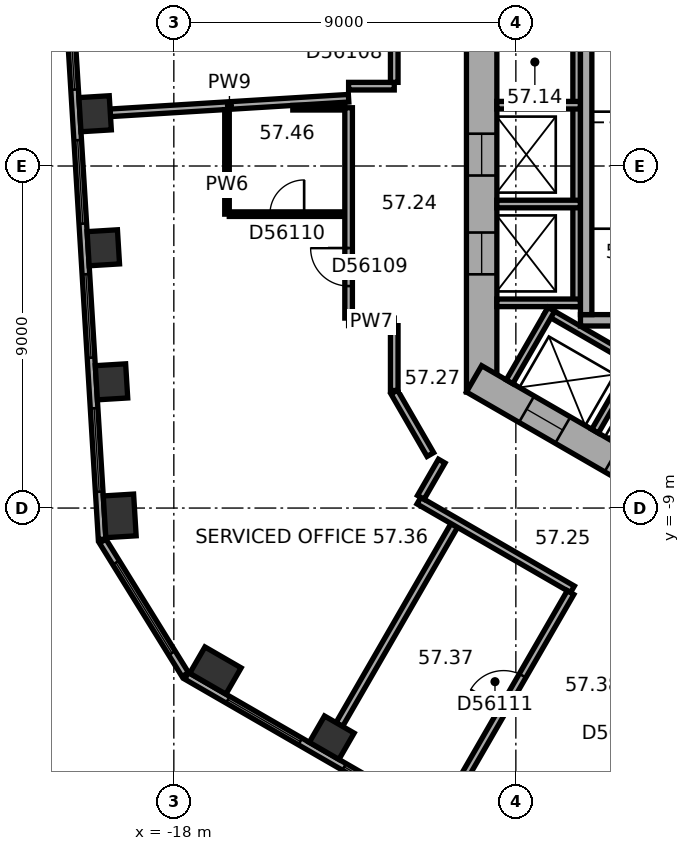
"""IFC4 building model, lengths in metres.
Left out: names, types, materials, properties, quantities, classifications, styles, units other than length and angle.
Written with IfcOpenShell. Run it as: python <this file> out.ifc"""

import sys

from ifc_helpers import new_model, si_unit, direction, frame, frame_2d, origin, origin_2d, place, context, subcontext, project, spatial, rectangle, extrude, element, fill, save


model = new_model("IFC4")
c1 = context("Model", 3, precision=1e-05, world=origin(), true_north=direction((0.0, 1.0)))
c2 = subcontext(c1, "Body", "Model", "MODEL_VIEW")
j1 = project(units=[si_unit("LENGTHUNIT", "METRE"), si_unit("PLANEANGLEUNIT", "RADIAN")], contexts=[c1])
p1 = place(None, origin())
s1 = spatial("IfcSite", under=j1, at=p1, CompositionType="ELEMENT")
p2 = place(p1, origin())
s2 = spatial("IfcBuilding", under=s1, at=p2, CompositionType="ELEMENT")
p3 = place(p2, frame((0.0, 0.0, 232.8)))
s3 = spatial("IfcBuildingStorey", under=s2, at=p3, CompositionType="ELEMENT", Elevation=232.8)
for number, where, z_axis, x_axis in (
    (1, (-20.071, 1.375, 0.0), (0.0, 0.0, 1.0), (0.061, -0.998, 0.0)),
    (2, (-19.856, -2.152, 0.0), (0.0, 0.0, 1.0), (0.061, -0.998, 0.0)),
    (3, (-19.64, -5.679, 0.0), (0.0, 0.0, 1.0), (0.061, -0.998, 0.0)),
):
    element("IfcColumn", number, at=place(p3, frame(where, z_axis=z_axis, x_axis=x_axis)), inside=s3, PredefinedType="COLUMN", context=c2, shape_type="SweptSolid", body=[
        extrude(rectangle(XDim=0.9, YDim=0.8, at=origin_2d()), origin(), (0.0, 0.0, 1.0), 3.7),
    ])
for number, where, z_axis, x_axis in (
    (4, (-19.424, -9.206, 0.0), (0.0, 0.0, 1.0), (0.061, -0.998, 0.0)),
    (5, (-16.906, -13.276, 0.0), (0.0, 0.0, 1.0), (0.866, -0.5, 0.0)),
):
    element("IfcColumn", number, at=place(p3, frame(where, z_axis=z_axis, x_axis=x_axis)), inside=s3, PredefinedType="COLUMN", context=c2, shape_type="SweptSolid", body=[
        extrude(rectangle(XDim=1.1, YDim=0.8, at=origin_2d()), origin(), (0.0, 0.0, 1.0), 3.7),
    ])
p4 = place(p3, frame((-13.845, -15.042, 0.0), z_axis=(0.0, 0.0, 1.0), x_axis=(0.866025403784, -0.5, 0.0)))
e6 = element("IfcColumn", 6, at=p4, inside=s3, PredefinedType="COLUMN", context=c2, shape_type="SweptSolid", body=[
    extrude(rectangle(XDim=0.9, YDim=0.8, at=origin_2d()), origin(), (0.0, 0.0, 1.0), 3.7),
])
p5 = place(p3, frame((-9.9, 5.947, 0.0), z_axis=(0.0, 0.0, 1.0), x_axis=(0.0, -1.0, 0.0)))
e7 = element("IfcWall", 7, at=p5, inside=s3, PredefinedType="SHEAR", context=c2, shape_type="SweptSolid", body=[
    extrude(rectangle(XDim=11.894, YDim=0.8, at=frame_2d((5.947, 0.0))), origin(), (0.0, 0.0, 1.0), 3.7),
])
p6 = place(p5, frame((5.097, 0.0, 0.0)))
e8 = element("IfcOpeningElement", 8, at=p6, cuts=e7, PredefinedType="OPENING", context=c2, shape_type="SweptSolid", body=[
    extrude(rectangle(XDim=1.1, YDim=2.1, at=frame_2d((0.55, 1.05))), frame((0.0, 0.41, 0.0), z_axis=(0.0, -1.0, 0.0), x_axis=(1.0, 0.0, 0.0)), (0.0, 0.0, 1.0), 0.82),
])
p7 = place(p5, frame((7.697, 0.0, 0.0)))
e9 = element("IfcOpeningElement", 9, at=p7, cuts=e7, PredefinedType="OPENING", context=c2, shape_type="SweptSolid", body=[
    extrude(rectangle(XDim=1.1, YDim=2.1, at=frame_2d((0.55, 1.05))), frame((0.0, 0.41, 0.0), z_axis=(0.0, -1.0, 0.0), x_axis=(1.0, 0.0, 0.0)), (0.0, 0.0, 1.0), 0.82),
])
p8 = place(p3, frame((-10.1, -5.6, 0.0), z_axis=(0.0, 0.0, 1.0), x_axis=(0.866023897231, -0.500002609418, 0.0)))
e10 = element("IfcWall", 10, at=p8, inside=s3, PredefinedType="SHEAR", context=c2, shape_type="SweptSolid", body=[
    extrude(rectangle(XDim=11.894, YDim=0.8, at=frame_2d((5.947, 0.0))), origin(), (0.0, 0.0, 1.0), 3.7),
])
p9 = place(p8, frame((6.147, 0.0, 0.0)))
e11 = element("IfcOpeningElement", 11, at=p9, cuts=e10, PredefinedType="OPENING", context=c2, shape_type="SweptSolid", body=[
    extrude(rectangle(XDim=1.5, YDim=2.1, at=frame_2d((0.75, 1.05))), frame((0.0, 0.41, 0.0), z_axis=(0.0, -1.0, 0.0), x_axis=(1.0, 0.0, 0.0)), (0.0, 0.0, 1.0), 0.82),
])
p10 = place(p8, frame((1.597, 0.0, 0.0)))
e12 = element("IfcOpeningElement", 12, at=p10, cuts=e10, PredefinedType="OPENING", context=c2, shape_type="SweptSolid", body=[
    extrude(rectangle(XDim=1.1, YDim=2.1, at=frame_2d((0.55, 1.05))), frame((0.0, 0.41, 0.0), z_axis=(0.0, -1.0, 0.0), x_axis=(1.0, 0.0, 0.0)), (0.0, 0.0, 1.0), 0.82),
])
p11 = place(p8, frame((4.197, 0.0, 0.0)))
e13 = element("IfcOpeningElement", 13, at=p11, cuts=e10, PredefinedType="OPENING", context=c2, shape_type="SweptSolid", body=[
    extrude(rectangle(XDim=1.1, YDim=2.1, at=frame_2d((0.55, 1.05))), frame((0.0, 0.41, 0.0), z_axis=(0.0, -1.0, 0.0), x_axis=(1.0, 0.0, 0.0)), (0.0, 0.0, 1.0), 0.82),
])
p12 = place(p3, frame((-21.038, 8.984, 0.0), z_axis=(0.0, 0.0, 1.0), x_axis=(0.061043935634, -0.998135079998, 0.0)))
e14 = element("IfcWall", 14, at=p12, inside=s3, PredefinedType="STANDARD", context=c2, shape_type="SweptSolid", body=[
    extrude(rectangle(XDim=18.841, YDim=0.2, at=frame_2d((9.421, 0.0))), origin(), (0.0, 0.0, 1.0), 3.7),
])
p13 = place(p12, frame((1.253, 0.0, 0.9)))
e15 = element("IfcOpeningElement", 15, at=p13, cuts=e14, PredefinedType="OPENING", context=c2, shape_type="SweptSolid", body=[
    extrude(rectangle(XDim=2.2, YDim=2.0, at=frame_2d((1.1, 1.0))), frame((0.0, 0.11, 0.0), z_axis=(0.0, -1.0, 0.0), x_axis=(1.0, 0.0, 0.0)), (0.0, 0.0, 1.0), 0.22),
])
p14 = place(p12, frame((4.786, 0.0, 0.9)))
e16 = element("IfcOpeningElement", 16, at=p14, cuts=e14, PredefinedType="OPENING", context=c2, shape_type="SweptSolid", body=[
    extrude(rectangle(XDim=2.2, YDim=2.0, at=frame_2d((1.1, 1.0))), frame((0.0, 0.11, 0.0), z_axis=(0.0, -1.0, 0.0), x_axis=(1.0, 0.0, 0.0)), (0.0, 0.0, 1.0), 0.22),
])
p15 = place(p12, frame((8.32, 0.0, 0.9)))
e17 = element("IfcOpeningElement", 17, at=p15, cuts=e14, PredefinedType="OPENING", context=c2, shape_type="SweptSolid", body=[
    extrude(rectangle(XDim=2.2, YDim=2.0, at=frame_2d((1.1, 1.0))), frame((0.0, 0.11, 0.0), z_axis=(0.0, -1.0, 0.0), x_axis=(1.0, 0.0, 0.0)), (0.0, 0.0, 1.0), 0.22),
])
p16 = place(p12, frame((11.854, 0.0, 0.9)))
e18 = element("IfcOpeningElement", 18, at=p16, cuts=e14, PredefinedType="OPENING", context=c2, shape_type="SweptSolid", body=[
    extrude(rectangle(XDim=2.2, YDim=2.0, at=frame_2d((1.1, 1.0))), frame((0.0, 0.11, 0.0), z_axis=(0.0, -1.0, 0.0), x_axis=(1.0, 0.0, 0.0)), (0.0, 0.0, 1.0), 0.22),
])
p17 = place(p12, frame((15.387, 0.0, 0.9)))
e19 = element("IfcOpeningElement", 19, at=p17, cuts=e14, PredefinedType="OPENING", context=c2, shape_type="SweptSolid", body=[
    extrude(rectangle(XDim=2.2, YDim=2.0, at=frame_2d((1.1, 1.0))), frame((0.0, 0.11, 0.0), z_axis=(0.0, -1.0, 0.0), x_axis=(1.0, 0.0, 0.0)), (0.0, 0.0, 1.0), 0.22),
])
p18 = place(p3, frame((-19.873, -9.869, 0.0), z_axis=(0.0, 0.0, 1.0), x_axis=(0.52626914263, -0.850318051975, 0.0)))
e20 = element("IfcWall", 20, at=p18, inside=s3, PredefinedType="STANDARD", context=c2, shape_type="SweptSolid", body=[
    extrude(rectangle(XDim=4.13, YDim=0.2, at=frame_2d((2.065, 0.0))), origin(), (0.0, 0.0, 1.0), 3.7),
])
p19 = place(p18, frame((0.665, 0.0, 0.9)))
e21 = element("IfcOpeningElement", 21, at=p19, cuts=e20, PredefinedType="OPENING", context=c2, shape_type="SweptSolid", body=[
    extrude(rectangle(XDim=2.8, YDim=2.0, at=frame_2d((1.4, 1.0))), frame((0.0, 0.11, 0.0), z_axis=(0.0, -1.0, 0.0), x_axis=(1.0, 0.0, 0.0)), (0.0, 0.0, 1.0), 0.22),
])
p20 = place(p3, frame((-17.664, -13.415, 0.0), z_axis=(0.0, 0.0, 1.0), x_axis=(0.866026555358, -0.49999800541, 0.0)))
e22 = element("IfcWall", 22, at=p20, inside=s3, PredefinedType="STANDARD", context=c2, shape_type="SweptSolid", body=[
    extrude(rectangle(XDim=18.841, YDim=0.2, at=frame_2d((9.421, 0.0))), origin(), (0.0, 0.0, 1.0), 3.7),
])
p21 = place(p20, frame((1.254, 0.0, 0.9)))
e23 = element("IfcOpeningElement", 23, at=p21, cuts=e22, PredefinedType="OPENING", context=c2, shape_type="SweptSolid", body=[
    extrude(rectangle(XDim=2.2, YDim=2.0, at=frame_2d((1.1, 1.0))), frame((0.0, 0.11, 0.0), z_axis=(0.0, -1.0, 0.0), x_axis=(1.0, 0.0, 0.0)), (0.0, 0.0, 1.0), 0.22),
])
p22 = place(p20, frame((4.788, 0.0, 0.9)))
e24 = element("IfcOpeningElement", 24, at=p22, cuts=e22, PredefinedType="OPENING", context=c2, shape_type="SweptSolid", body=[
    extrude(rectangle(XDim=2.2, YDim=2.0, at=frame_2d((1.1, 1.0))), frame((0.0, 0.11, 0.0), z_axis=(0.0, -1.0, 0.0), x_axis=(1.0, 0.0, 0.0)), (0.0, 0.0, 1.0), 0.22),
])
p23 = place(p20, frame((8.322, 0.0, 0.9)))
e25 = element("IfcOpeningElement", 25, at=p23, cuts=e22, PredefinedType="OPENING", context=c2, shape_type="SweptSolid", body=[
    extrude(rectangle(XDim=2.2, YDim=2.0, at=frame_2d((1.1, 1.0))), frame((0.0, 0.11, 0.0), z_axis=(0.0, -1.0, 0.0), x_axis=(1.0, 0.0, 0.0)), (0.0, 0.0, 1.0), 0.22),
])
p24 = place(p20, frame((11.855, 0.0, 0.9)))
e26 = element("IfcOpeningElement", 26, at=p24, cuts=e22, PredefinedType="OPENING", context=c2, shape_type="SweptSolid", body=[
    extrude(rectangle(XDim=2.2, YDim=2.0, at=frame_2d((1.1, 1.0))), frame((0.0, 0.11, 0.0), z_axis=(0.0, -1.0, 0.0), x_axis=(1.0, 0.0, 0.0)), (0.0, 0.0, 1.0), 0.22),
])
p25 = place(p20, frame((15.389, 0.0, 0.9)))
e27 = element("IfcOpeningElement", 27, at=p25, cuts=e22, PredefinedType="OPENING", context=c2, shape_type="SweptSolid", body=[
    extrude(rectangle(XDim=2.2, YDim=2.0, at=frame_2d((1.1, 1.0))), frame((0.0, 0.11, 0.0), z_axis=(0.0, -1.0, 0.0), x_axis=(1.0, 0.0, 0.0)), (0.0, 0.0, 1.0), 0.22),
])
p26 = place(p3, frame((-7.4, 4.3, 0.0), z_axis=(0.0, 0.0, 1.0), x_axis=(0.0, -1.0, 0.0)))
e28 = element("IfcWall", 28, at=p26, inside=s3, PredefinedType="PARTITIONING", context=c2, shape_type="SweptSolid", body=[
    extrude(rectangle(XDim=8.0, YDim=0.2, at=frame_2d((4.0, 0.0))), origin(), (0.0, 0.0, 1.0), 3.42),
])
for number, where, z_axis, x_axis in (
    (29, (-7.3, 1.6, 0.0), (0.0, 0.0, 1.0), (-1.0, 0.0, 0.0)),
    (30, (-7.3, -1.0, 0.0), (0.0, 0.0, 1.0), (-1.0, 0.0, 0.0)),
    (31, (-7.3, -3.6, 0.0), (0.0, 0.0, 1.0), (-1.0, 0.0, 0.0)),
):
    element("IfcWall", number, at=place(p3, frame(where, z_axis=z_axis, x_axis=x_axis)), inside=s3, PredefinedType="PARTITIONING", context=c2, shape_type="SweptSolid", body=[
        extrude(rectangle(XDim=2.2, YDim=0.2, at=frame_2d((1.1, 0.0))), origin(), (0.0, 0.0, 1.0), 3.42),
    ])
p27 = place(p3, frame((-8.203, -3.809, 0.0), z_axis=(0.0, 0.0, 1.0), x_axis=(0.866028230842, -0.499995103361, 0.0)))
e32 = element("IfcWall", 32, at=p27, inside=s3, PredefinedType="PARTITIONING", context=c2, shape_type="SweptSolid", body=[
    extrude(rectangle(XDim=5.4, YDim=0.2, at=frame_2d((2.7, 0.0))), origin(), (0.0, 0.0, 1.0), 3.42),
])
for number, where, z_axis, x_axis in (
    (33, (-8.067, -3.772, 0.0), (0.0, 0.0, 1.0), (-0.5, -0.866, 0.0)),
    (34, (-5.815, -5.072, 0.0), (0.0, 0.0, 1.0), (-0.5, -0.866, 0.0)),
):
    element("IfcWall", number, at=place(p3, frame(where, z_axis=z_axis, x_axis=x_axis)), inside=s3, PredefinedType="PARTITIONING", context=c2, shape_type="SweptSolid", body=[
        extrude(rectangle(XDim=2.2, YDim=0.2, at=frame_2d((1.1, 0.0))), origin(), (0.0, 0.0, 1.0), 3.42),
    ])
p28 = place(p3, frame((-2.6, -4.06, 0.0), z_axis=(0.0, 0.0, 1.0), x_axis=(-1.0, 0.0, 0.0)))
e35 = element("IfcWall", 35, at=p28, inside=s3, PredefinedType="SHEAR", context=c2, shape_type="SweptSolid", body=[
    extrude(rectangle(XDim=4.7, YDim=0.3, at=frame_2d((2.35, 0.0))), origin(), (0.0, 0.0, 1.0), 3.42),
])
p29 = place(p3, frame((-7.15, 3.15, 0.0), z_axis=(0.0, 0.0, 1.0), x_axis=(0.0, -1.0, 0.0)))
e36 = element("IfcWall", 36, at=p29, inside=s3, PredefinedType="SHEAR", context=c2, shape_type="SweptSolid", body=[
    extrude(rectangle(XDim=7.06, YDim=0.3, at=frame_2d((3.53, 0.0))), origin(), (0.0, 0.0, 1.0), 3.42),
])
p30 = place(p3, frame((-19.672, 1.4, 0.0), z_axis=(0.0, 0.0, 1.0), x_axis=(0.99813499784, 0.061045278997, 0.0)))
e37 = element("IfcWall", 37, at=p30, inside=s3, PredefinedType="PARTITIONING", context=c2, shape_type="SweptSolid", body=[
    extrude(rectangle(XDim=6.283, YDim=0.2, at=frame_2d((3.142, 0.0))), origin(), (0.0, 0.0, 1.0), 2.87),
])
p31 = place(p3, frame((-16.601, -1.267, 0.0), z_axis=(0.0, 0.0, 1.0), x_axis=(0.0, 1.0, 0.0)))
e38 = element("IfcWall", 38, at=p31, inside=s3, PredefinedType="PARTITIONING", context=c2, shape_type="SweptSolid", body=[
    extrude(rectangle(XDim=2.75, YDim=0.12, at=frame_2d((1.375, 0.0))), origin(), (0.0, 0.0, 1.0), 3.42),
])
p32 = place(p3, frame((-14.869, 1.533, 0.0), z_axis=(0.0, 0.0, 1.0), x_axis=(1.0, 0.0, 0.0)))
e39 = element("IfcWall", 39, at=p32, inside=s3, PredefinedType="PARTITIONING", context=c2, shape_type="SweptSolid", body=[
    extrude(rectangle(XDim=1.368, YDim=0.12, at=frame_2d((0.684, 0.0))), origin(), (0.0, 0.0, 1.0), 3.42),
])
p33 = place(p3, frame((-13.646, -14.696, 0.0), z_axis=(0.0, 0.0, 1.0), x_axis=(0.500006596359, 0.866021595341, 0.0)))
e40 = element("IfcWall", 40, at=p33, inside=s3, PredefinedType="PARTITIONING", context=c2, shape_type="SweptSolid", body=[
    extrude(rectangle(XDim=6.049, YDim=0.2, at=frame_2d((3.025, 0.0))), origin(), (0.0, 0.0, 1.0), 3.42),
])
p34 = place(p3, frame((-13.501, -1.267, 0.0), z_axis=(0.0, 0.0, 1.0), x_axis=(-1.0, 0.0, 0.0)))
e41 = element("IfcWall", 41, at=p34, inside=s3, PredefinedType="PARTITIONING", context=c2, shape_type="SweptSolid", body=[
    extrude(rectangle(XDim=3.04, YDim=0.12, at=frame_2d((1.52, 0.0))), origin(), (0.0, 0.0, 1.0), 3.42),
])
p35 = place(p34, frame((1.07, 0.0, 0.0)))
e42 = element("IfcOpeningElement", 42, at=p35, cuts=e41, PredefinedType="OPENING", context=c2, shape_type="SweptSolid", body=[
    extrude(rectangle(XDim=0.9, YDim=2.1, at=frame_2d((0.45, 1.05))), frame((0.0, 0.07, 0.0), z_axis=(0.0, -1.0, 0.0), x_axis=(1.0, 0.0, 0.0)), (0.0, 0.0, 1.0), 0.14),
])
p36 = place(p3, frame((-13.401, -4.101, 0.0), z_axis=(0.0, 0.0, 1.0), x_axis=(1.0, 0.0, 0.0)))
e43 = element("IfcWall", 43, at=p36, inside=s3, PredefinedType="PARTITIONING", context=c2, shape_type="SweptSolid", body=[
    extrude(rectangle(XDim=1.201, YDim=0.2, at=frame_2d((0.601, 0.0))), origin(), (0.0, 0.0, 1.0), 3.42),
])
p37 = place(p3, frame((-13.401, 1.533, 0.0), z_axis=(0.0, 0.0, 1.0), x_axis=(0.0, -1.0, 0.0)))
e44 = element("IfcWall", 44, at=p37, inside=s3, PredefinedType="PARTITIONING", context=c2, shape_type="SweptSolid", body=[
    extrude(rectangle(XDim=5.534, YDim=0.2, at=frame_2d((2.767, 0.0))), origin(), (0.0, 0.0, 1.0), 3.42),
])
p38 = place(p37, frame((3.692, 0.0, 0.0)))
e45 = element("IfcOpeningElement", 45, at=p38, cuts=e44, PredefinedType="OPENING", context=c2, shape_type="SweptSolid", body=[
    extrude(rectangle(XDim=1.0, YDim=2.1, at=frame_2d((0.5, 1.05))), frame((0.0, 0.11, 0.0), z_axis=(0.0, -1.0, 0.0), x_axis=(1.0, 0.0, 0.0)), (0.0, 0.0, 1.0), 0.22),
])
p39 = place(p3, frame((-12.2, -5.947, 0.0), z_axis=(0.0, 0.0, 1.0), x_axis=(0.500022797313, -0.86601224135, 0.0)))
e46 = element("IfcWall", 46, at=p39, inside=s3, PredefinedType="PARTITIONING", context=c2, shape_type="SweptSolid", body=[
    extrude(rectangle(XDim=1.9, YDim=0.2, at=frame_2d((0.95, 0.0))), origin(), (0.0, 0.0, 1.0), 3.42),
])
p40 = place(p3, frame((-12.2, -4.201, 0.0), z_axis=(0.0, 0.0, 1.0), x_axis=(0.0, -1.0, 0.0)))
e47 = element("IfcWall", 47, at=p40, inside=s3, PredefinedType="PARTITIONING", context=c2, shape_type="SweptSolid", body=[
    extrude(rectangle(XDim=1.706, YDim=0.2, at=frame_2d((0.853, 0.0))), origin(), (0.0, 0.0, 1.0), 3.42),
])
p41 = place(p3, frame((-12.2, 2.101, 0.0), z_axis=(0.0, 0.0, 1.0), x_axis=(-1.0, 0.0, 0.0)))
e48 = element("IfcWall", 48, at=p41, inside=s3, PredefinedType="PARTITIONING", context=c2, shape_type="SweptSolid", body=[
    extrude(rectangle(XDim=1.201, YDim=0.2, at=frame_2d((0.601, 0.0))), origin(), (0.0, 0.0, 1.0), 3.42),
])
p42 = place(p3, frame((-12.2, 5.697, 0.0), z_axis=(0.0, 0.0, 1.0), x_axis=(0.0, -1.0, 0.0)))
e49 = element("IfcWall", 49, at=p42, inside=s3, PredefinedType="PARTITIONING", context=c2, shape_type="SweptSolid", body=[
    extrude(rectangle(XDim=3.496, YDim=0.2, at=frame_2d((1.748, 0.0))), origin(), (0.0, 0.0, 1.0), 3.42),
])
p43 = place(p3, frame((-11.551, -8.805, 0.0), z_axis=(0.0, 0.0, 1.0), x_axis=(0.866038310922, -0.499977643516, 0.0)))
e50 = element("IfcWall", 50, at=p43, inside=s3, PredefinedType="PARTITIONING", context=c2, shape_type="SweptSolid", body=[
    extrude(rectangle(XDim=4.665, YDim=0.2, at=frame_2d((2.333, 0.0))), origin(), (0.0, 0.0, 1.0), 3.42),
])
p44 = place(p3, frame((-10.951, -7.765, 0.0), z_axis=(0.0, 0.0, 1.0), x_axis=(-0.499978356969, -0.866037899034, 0.0)))
e51 = element("IfcWall", 51, at=p44, inside=s3, PredefinedType="PARTITIONING", context=c2, shape_type="SweptSolid", body=[
    extrude(rectangle(XDim=1.101, YDim=0.2, at=frame_2d((0.551, 0.0))), origin(), (0.0, 0.0, 1.0), 3.42),
])
p45 = place(p3, frame((-10.585, -16.463, 0.0), z_axis=(0.0, 0.0, 1.0), x_axis=(0.499993802756, 0.866028981735, 0.0)))
e52 = element("IfcWall", 52, at=p45, inside=s3, PredefinedType="PARTITIONING", context=c2, shape_type="SweptSolid", body=[
    extrude(rectangle(XDim=6.049, YDim=0.2, at=frame_2d((3.024, 0.0))), origin(), (0.0, 0.0, 1.0), 2.87),
])
p46 = place(p45, frame((2.524, 0.0, 0.0)))
e53 = element("IfcOpeningElement", 53, at=p46, cuts=e52, PredefinedType="OPENING", context=c2, shape_type="SweptSolid", body=[
    extrude(rectangle(XDim=1.0, YDim=2.1, at=frame_2d((0.5, 1.05))), frame((0.0, 0.11, 0.0), z_axis=(0.0, -1.0, 0.0), x_axis=(1.0, 0.0, 0.0)), (0.0, 0.0, 1.0), 0.22),
])
p47 = place(p3, frame((-7.525, -18.23, 0.0), z_axis=(0.0, 0.0, 1.0), x_axis=(0.499983153418, 0.866035129944, 0.0)))
e54 = element("IfcWall", 54, at=p47, inside=s3, PredefinedType="PARTITIONING", context=c2, shape_type="SweptSolid", body=[
    extrude(rectangle(XDim=7.35, YDim=0.2, at=frame_2d((3.675, 0.0))), origin(), (0.0, 0.0, 1.0), 3.42),
])
p48 = place(p47, frame((2.975, 0.0, 0.0)))
e55 = element("IfcOpeningElement", 55, at=p48, cuts=e54, PredefinedType="OPENING", context=c2, shape_type="SweptSolid", body=[
    extrude(rectangle(XDim=1.0, YDim=2.1, at=frame_2d((0.5, 1.05))), frame((0.0, 0.11, 0.0), z_axis=(0.0, -1.0, 0.0), x_axis=(1.0, 0.0, 0.0)), (0.0, 0.0, 1.0), 0.22),
])
p49 = place(p14, origin())
e56 = element("IfcWindow", 56, at=p49, inside=s3, PartitioningType="SINGLE_PANEL", PredefinedType="WINDOW", context=c2, shape_type="SweptSolid", body=[
    extrude(rectangle(XDim=2.2, YDim=2.0, at=frame_2d((1.1, 1.0))), frame((0.0, 0.03, 0.0), z_axis=(0.0, -1.0, 0.0), x_axis=(1.0, 0.0, 0.0)), (0.0, 0.0, 1.0), 0.06),
])
fill(e16, e56)
p50 = place(p15, origin())
e57 = element("IfcWindow", 57, at=p50, inside=s3, PartitioningType="SINGLE_PANEL", PredefinedType="WINDOW", context=c2, shape_type="SweptSolid", body=[
    extrude(rectangle(XDim=2.2, YDim=2.0, at=frame_2d((1.1, 1.0))), frame((0.0, 0.03, 0.0), z_axis=(0.0, -1.0, 0.0), x_axis=(1.0, 0.0, 0.0)), (0.0, 0.0, 1.0), 0.06),
])
fill(e17, e57)
p51 = place(p16, origin())
e58 = element("IfcWindow", 58, at=p51, inside=s3, PartitioningType="SINGLE_PANEL", PredefinedType="WINDOW", context=c2, shape_type="SweptSolid", body=[
    extrude(rectangle(XDim=2.2, YDim=2.0, at=frame_2d((1.1, 1.0))), frame((0.0, 0.03, 0.0), z_axis=(0.0, -1.0, 0.0), x_axis=(1.0, 0.0, 0.0)), (0.0, 0.0, 1.0), 0.06),
])
fill(e18, e58)
p52 = place(p17, origin())
e59 = element("IfcWindow", 59, at=p52, inside=s3, PartitioningType="SINGLE_PANEL", PredefinedType="WINDOW", context=c2, shape_type="SweptSolid", body=[
    extrude(rectangle(XDim=2.2, YDim=2.0, at=frame_2d((1.1, 1.0))), frame((0.0, 0.03, 0.0), z_axis=(0.0, -1.0, 0.0), x_axis=(1.0, 0.0, 0.0)), (0.0, 0.0, 1.0), 0.06),
])
fill(e19, e59)
p53 = place(p19, origin())
e60 = element("IfcWindow", 60, at=p53, inside=s3, PartitioningType="SINGLE_PANEL", PredefinedType="WINDOW", context=c2, shape_type="SweptSolid", body=[
    extrude(rectangle(XDim=2.8, YDim=2.0, at=frame_2d((1.4, 1.0))), frame((0.0, 0.03, 0.0), z_axis=(0.0, -1.0, 0.0), x_axis=(1.0, 0.0, 0.0)), (0.0, 0.0, 1.0), 0.06),
])
fill(e21, e60)
p54 = place(p21, origin())
e61 = element("IfcWindow", 61, at=p54, inside=s3, PartitioningType="SINGLE_PANEL", PredefinedType="WINDOW", context=c2, shape_type="SweptSolid", body=[
    extrude(rectangle(XDim=2.2, YDim=2.0, at=frame_2d((1.1, 1.0))), frame((0.0, 0.03, 0.0), z_axis=(0.0, -1.0, 0.0), x_axis=(1.0, 0.0, 0.0)), (0.0, 0.0, 1.0), 0.06),
])
fill(e23, e61)
p55 = place(p22, origin())
e62 = element("IfcWindow", 62, at=p55, inside=s3, PartitioningType="SINGLE_PANEL", PredefinedType="WINDOW", context=c2, shape_type="SweptSolid", body=[
    extrude(rectangle(XDim=2.2, YDim=2.0, at=frame_2d((1.1, 1.0))), frame((0.0, 0.03, 0.0), z_axis=(0.0, -1.0, 0.0), x_axis=(1.0, 0.0, 0.0)), (0.0, 0.0, 1.0), 0.06),
])
fill(e24, e62)
p56 = place(p6, origin())
e63 = element("IfcDoor", 63, at=p56, inside=s3, OperationType="DOUBLE_DOOR_SLIDING", PredefinedType="DOOR", context=c2, shape_type="SweptSolid", body=[
    extrude(rectangle(XDim=1.1, YDim=2.1, at=frame_2d((0.55, 1.05))), frame((0.0, 0.025, 0.0), z_axis=(0.0, -1.0, 0.0), x_axis=(1.0, 0.0, 0.0)), (0.0, 0.0, 1.0), 0.05),
])
fill(e8, e63)
p57 = place(p7, origin())
e64 = element("IfcDoor", 64, at=p57, inside=s3, OperationType="DOUBLE_DOOR_SLIDING", PredefinedType="DOOR", context=c2, shape_type="SweptSolid", body=[
    extrude(rectangle(XDim=1.1, YDim=2.1, at=frame_2d((0.55, 1.05))), frame((0.0, 0.025, 0.0), z_axis=(0.0, -1.0, 0.0), x_axis=(1.0, 0.0, 0.0)), (0.0, 0.0, 1.0), 0.05),
])
fill(e9, e64)
p58 = place(p10, origin())
e65 = element("IfcDoor", 65, at=p58, inside=s3, OperationType="DOUBLE_DOOR_SLIDING", PredefinedType="DOOR", context=c2, shape_type="SweptSolid", body=[
    extrude(rectangle(XDim=1.1, YDim=2.1, at=frame_2d((0.55, 1.05))), frame((0.0, 0.025, 0.0), z_axis=(0.0, -1.0, 0.0), x_axis=(1.0, 0.0, 0.0)), (0.0, 0.0, 1.0), 0.05),
])
fill(e12, e65)
p59 = place(p38, origin())
e66 = element("IfcDoor", 66, at=p59, inside=s3, OperationType="SINGLE_SWING_LEFT", PredefinedType="DOOR", context=c2, shape_type="SweptSolid", body=[
    extrude(rectangle(XDim=1.0, YDim=2.1, at=frame_2d((0.5, 1.05))), frame((0.0, 0.025, 0.0), z_axis=(0.0, -1.0, 0.0), x_axis=(1.0, 0.0, 0.0)), (0.0, 0.0, 1.0), 0.05),
])
fill(e45, e66)
p60 = place(p35, origin())
e67 = element("IfcDoor", 67, at=p60, inside=s3, OperationType="SINGLE_SWING_LEFT", PredefinedType="DOOR", context=c2, shape_type="SweptSolid", body=[
    extrude(rectangle(XDim=0.9, YDim=2.1, at=frame_2d((0.45, 1.05))), frame((0.0, 0.025, 0.0), z_axis=(0.0, -1.0, 0.0), x_axis=(1.0, 0.0, 0.0)), (0.0, 0.0, 1.0), 0.05),
])
fill(e42, e67)
p61 = place(p46, origin())
e68 = element("IfcDoor", 68, at=p61, inside=s3, OperationType="SINGLE_SWING_LEFT", PredefinedType="DOOR", context=c2, shape_type="SweptSolid", body=[
    extrude(rectangle(XDim=1.0, YDim=2.1, at=frame_2d((0.5, 1.05))), frame((0.0, 0.025, 0.0), z_axis=(0.0, -1.0, 0.0), x_axis=(1.0, 0.0, 0.0)), (0.0, 0.0, 1.0), 0.05),
])
fill(e53, e68)
save(model, sys.argv[1])
